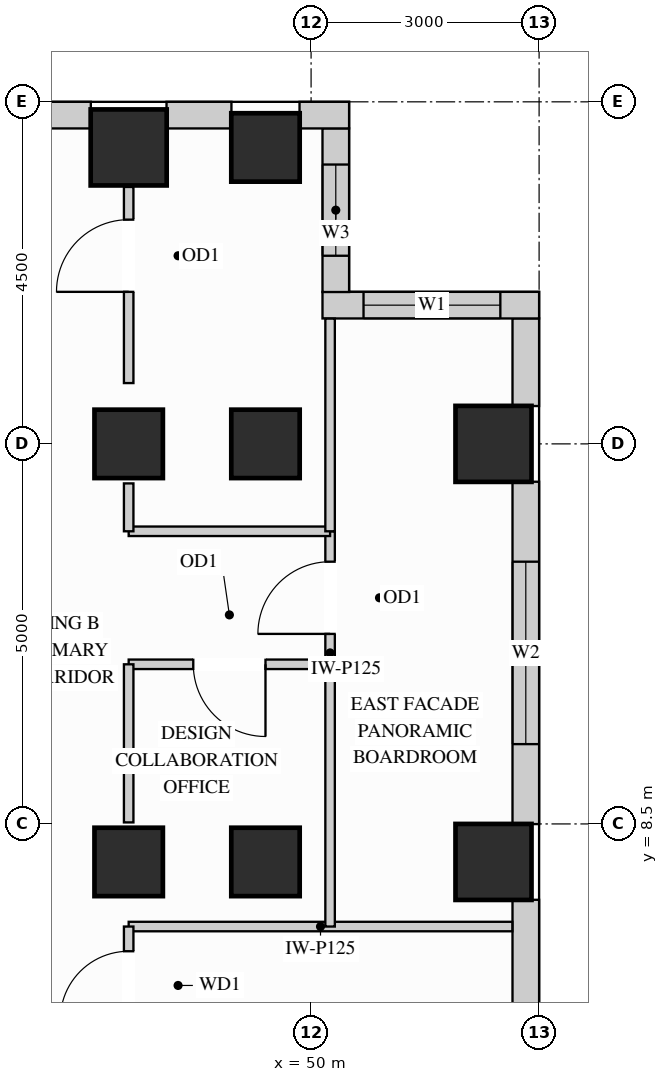
"""IFC4 building model, lengths in metres.
Left out: names, types, materials, properties, quantities, classifications, styles, units other than length and angle.
Written with IfcOpenShell. Run it as: python <this file> out.ifc"""

import sys

from ifc_helpers import new_model, si_unit, direction, frame, frame_2d, origin, origin_2d, place, context, subcontext, project, spatial, rectangle, extrude, source, transform, mapped, element, fill, save


model = new_model("IFC4")
c1 = context("Model", 3, precision=1e-05, world=origin(), true_north=direction((0.0, 1.0)))
c2 = subcontext(c1, "Body", "Model", "MODEL_VIEW")
j1 = project(units=[si_unit("LENGTHUNIT", "METRE"), si_unit("PLANEANGLEUNIT", "RADIAN")], contexts=[c1])
p1 = place(None, origin())
s1 = spatial("IfcSite", under=j1, at=p1, CompositionType="ELEMENT")
p2 = place(p1, origin())
s2 = spatial("IfcBuilding", under=s1, at=p2, CompositionType="ELEMENT")
p3 = place(p2, frame((0.0, 0.0, 197.1)))
s3 = spatial("IfcBuildingStorey", under=s2, at=p3, CompositionType="ELEMENT", Elevation=197.1)
m1 = source(origin(), c2, "Body", "SweptSolid", [
    extrude(rectangle(XDim=0.9, YDim=0.9, at=origin_2d()), origin(), (0.0, 0.0, 1.0), 3.4),
])
for number, where, z_axis, x_axis in (
    (1, (47.6, 13.5, 0.0), (0.0, 0.0, 1.0), (1.0, 0.0, 0.0)),
    (2, (47.6, 8.0, 0.0), (0.0, 0.0, 1.0), (1.0, 0.0, 0.0)),
    (3, (49.4, 13.5, 0.0), (0.0, 0.0, 1.0), (1.0, 0.0, 0.0)),
    (4, (49.4, 17.4, 0.0), (0.0, 0.0, 1.0), (1.0, 0.0, 0.0)),
    (5, (49.4, 8.0, 0.0), (0.0, 0.0, 1.0), (1.0, 0.0, 0.0)),
):
    element("IfcColumn", number, at=place(p3, frame(where, z_axis=z_axis, x_axis=x_axis)), inside=s3, PredefinedType="COLUMN", context=c2, shape_type="MappedRepresentation", body=[
        mapped(m1, transform((0.0, 0.0, 0.0), x_axis=(1.0, 0.0, 0.0), y_axis=(0.0, 1.0, 0.0), z_axis=(0.0, 0.0, 1.0))),
    ])
m2 = source(origin(), c2, "Body", "SweptSolid", [
    extrude(rectangle(XDim=1.0, YDim=1.0, at=origin_2d()), origin(), (0.0, 0.0, 1.0), 3.4),
])
for number, where, z_axis, x_axis in (
    (6, (47.6, 17.4, 0.0), (0.0, 0.0, 1.0), (1.0, 0.0, 0.0)),
    (7, (52.4, 13.5, 0.0), (0.0, 0.0, 1.0), (1.0, 0.0, 0.0)),
    (8, (52.4, 8.0, 0.0), (0.0, 0.0, 1.0), (1.0, 0.0, 0.0)),
):
    element("IfcColumn", number, at=place(p3, frame(where, z_axis=z_axis, x_axis=x_axis)), inside=s3, PredefinedType="COLUMN", context=c2, shape_type="MappedRepresentation", body=[
        mapped(m2, transform((0.0, 0.0, 0.0), x_axis=(1.0, 0.0, 0.0), y_axis=(0.0, 1.0, 0.0), z_axis=(0.0, 0.0, 1.0))),
    ])
m3 = source(origin(), c2, "Body", "SweptSolid", [
    extrude(rectangle(XDim=3.504, YDim=0.35, at=frame_2d((1.752, 0.0))), origin(), (0.0, 0.0, 1.0), 2.612),
])
p4 = place(p3, frame((52.825, 3.998, 0.0), z_axis=(0.0, 0.0, 1.0), x_axis=(0.0, 1.0, 0.0)))
e9 = element("IfcWall", 9, at=p4, inside=s3, PredefinedType="SOLIDWALL", context=c2, shape_type="MappedRepresentation", body=[
    mapped(m3, transform((0.0, 0.0, 0.0), x_axis=(1.0, 0.0, 0.0), y_axis=(0.0, 1.0, 0.0), z_axis=(0.0, 0.0, 1.0))),
])
p5 = place(p3, frame((52.825, 8.498, 0.0), z_axis=(0.0, 0.0, 1.0), x_axis=(0.0, 1.0, 0.0)))
e10 = element("IfcWall", 10, at=p5, inside=s3, PredefinedType="SOLIDWALL", context=c2, shape_type="SweptSolid", body=[
    extrude(rectangle(XDim=4.504, YDim=0.35, at=frame_2d((2.252, 0.0))), origin(), (0.0, 0.0, 1.0), 2.612),
])
p6 = place(p5, frame((1.052, 0.0, 0.78)))
e11 = element("IfcOpeningElement", 11, at=p6, cuts=e10, PredefinedType="OPENING", context=c2, shape_type="SweptSolid", body=[
    extrude(rectangle(XDim=2.4, YDim=1.652, at=frame_2d((1.2, 0.826))), frame((0.0, 0.185, 0.0), z_axis=(0.0, -1.0, 0.0), x_axis=(1.0, 0.0, 0.0)), (0.0, 0.0, 1.0), 0.37),
])
m4 = source(origin(), c2, "Body", "SweptSolid", [
    extrude(rectangle(XDim=1.154, YDim=0.35, at=frame_2d((0.577, 0.0))), origin(), (0.0, 0.0, 1.0), 3.385),
])
p7 = place(p3, frame((52.825, 13.998, 0.0), z_axis=(0.0, 0.0, 1.0), x_axis=(0.0, 1.0, 0.0)))
e12 = element("IfcWall", 12, at=p7, inside=s3, PredefinedType="SOLIDWALL", context=c2, shape_type="MappedRepresentation", body=[
    mapped(m4, transform((0.0, 0.0, 0.0), x_axis=(1.0, 0.0, 0.0), y_axis=(0.0, 1.0, 0.0), z_axis=(0.0, 0.0, 1.0))),
])
p8 = place(p3, frame((53.0, 15.325, 0.0), z_axis=(0.0, 0.0, 1.0), x_axis=(-1.0, 0.0, 0.0)))
e13 = element("IfcWall", 13, at=p8, inside=s3, PredefinedType="SOLIDWALL", context=c2, shape_type="SweptSolid", body=[
    extrude(rectangle(XDim=2.85, YDim=0.35, at=frame_2d((1.425, 0.0))), origin(), (0.0, 0.0, 1.0), 3.385),
])
p9 = place(p8, frame((0.51, 0.0, 0.78)))
e14 = element("IfcOpeningElement", 14, at=p9, cuts=e13, PredefinedType="OPENING", context=c2, shape_type="SweptSolid", body=[
    extrude(rectangle(XDim=1.8, YDim=2.1, at=frame_2d((0.9, 1.05))), frame((0.0, 0.185, 0.0), z_axis=(0.0, -1.0, 0.0), x_axis=(1.0, 0.0, 0.0)), (0.0, 0.0, 1.0), 0.37),
])
p10 = place(p3, frame((50.325, 15.498, 0.0), z_axis=(0.0, 0.0, 1.0), x_axis=(0.0, 1.0, 0.0)))
e15 = element("IfcWall", 15, at=p10, inside=s3, PredefinedType="SOLIDWALL", context=c2, shape_type="SweptSolid", body=[
    extrude(rectangle(XDim=2.154, YDim=0.35, at=frame_2d((1.077, 0.0))), origin(), (0.0, 0.0, 1.0), 3.385),
])
p11 = place(p10, frame((0.477, 0.0, 0.78)))
e16 = element("IfcOpeningElement", 16, at=p11, cuts=e15, PredefinedType="OPENING", context=c2, shape_type="SweptSolid", body=[
    extrude(rectangle(XDim=1.2, YDim=2.1, at=frame_2d((0.6, 1.05))), frame((0.0, 0.185, 0.0), z_axis=(0.0, -1.0, 0.0), x_axis=(1.0, 0.0, 0.0)), (0.0, 0.0, 1.0), 0.37),
])
m5 = source(origin(), c2, "Body", "SweptSolid", [
    extrude(rectangle(XDim=0.652, YDim=0.35, at=frame_2d((0.326, 0.0))), origin(), (0.0, 0.0, 1.0), 3.385),
])
p12 = place(p3, frame((50.5, 17.825, 0.0), z_axis=(0.0, 0.0, 1.0), x_axis=(-1.0, 0.0, 0.0)))
e17 = element("IfcWall", 17, at=p12, inside=s3, PredefinedType="SOLIDWALL", context=c2, shape_type="MappedRepresentation", body=[
    mapped(m5, transform((0.0, 0.0, 0.0), x_axis=(1.0, 0.0, 0.0), y_axis=(0.0, 1.0, 0.0), z_axis=(0.0, 0.0, 1.0))),
])
m6 = source(origin(), c2, "Body", "SweptSolid", [
    extrude(rectangle(XDim=0.854, YDim=0.35, at=frame_2d((0.427, 0.0))), origin(), (0.0, 0.0, 1.0), 3.385),
])
p13 = place(p3, frame((48.952, 17.825, 0.0), z_axis=(0.0, 0.0, 1.0), x_axis=(-1.0, 0.0, 0.0)))
e18 = element("IfcWall", 18, at=p13, inside=s3, PredefinedType="SOLIDWALL", context=c2, shape_type="MappedRepresentation", body=[
    mapped(m6, transform((0.0, 0.0, 0.0), x_axis=(1.0, 0.0, 0.0), y_axis=(0.0, 1.0, 0.0), z_axis=(0.0, 0.0, 1.0))),
])
p14 = place(p3, frame((47.102, 17.825, 0.0), z_axis=(0.0, 0.0, 1.0), x_axis=(-1.0, 0.0, 0.0)))
e19 = element("IfcWall", 19, at=p14, inside=s3, PredefinedType="SOLIDWALL", context=c2, shape_type="SweptSolid", body=[
    extrude(rectangle(XDim=6.604, YDim=0.35, at=frame_2d((3.302, 0.0))), origin(), (0.0, 0.0, 1.0), 2.612),
])
p15 = place(p14, frame((1.849, 0.0, 0.78)))
e20 = element("IfcOpeningElement", 20, at=p15, cuts=e19, PredefinedType="OPENING", context=c2, shape_type="SweptSolid", body=[
    extrude(rectangle(XDim=1.8, YDim=1.652, at=frame_2d((0.9, 0.826))), frame((0.0, 0.185, 0.0), z_axis=(0.0, -1.0, 0.0), x_axis=(1.0, 0.0, 0.0)), (0.0, 0.0, 1.0), 0.37),
])
p16 = place(p14, frame((4.067, 0.0, 0.78)))
e21 = element("IfcOpeningElement", 21, at=p16, cuts=e19, PredefinedType="OPENING", context=c2, shape_type="SweptSolid", body=[
    extrude(rectangle(XDim=1.8, YDim=1.652, at=frame_2d((0.9, 0.826))), frame((0.0, 0.185, 0.0), z_axis=(0.0, -1.0, 0.0), x_axis=(1.0, 0.0, 0.0)), (0.0, 0.0, 1.0), 0.37),
])
p17 = place(p3, frame((50.25, 10.6, 0.0), z_axis=(0.0, 0.0, 1.0), x_axis=(0.0, 1.0, 0.0)))
e22 = element("IfcWall", 22, at=p17, inside=s3, PredefinedType="PARTITIONING", context=c2, shape_type="SweptSolid", body=[
    extrude(rectangle(XDim=1.75, YDim=0.125, at=frame_2d((0.875, 0.0))), origin(), (0.0, 0.0, 1.0), 3.385),
])
p18 = place(p17, frame((0.4, 0.0, 0.0)))
e23 = element("IfcOpeningElement", 23, at=p18, cuts=e22, PredefinedType="OPENING", context=c2, shape_type="SweptSolid", body=[
    extrude(rectangle(XDim=0.95, YDim=2.15, at=frame_2d((0.475, 1.075))), frame((0.0, 0.073, 0.0), z_axis=(0.0, -1.0, 0.0), x_axis=(1.0, 0.0, 0.0)), (0.0, 0.0, 1.0), 0.145),
])
m7 = source(origin(), c2, "Body", "SweptSolid", [
    extrude(rectangle(XDim=5.048, YDim=0.125, at=frame_2d((2.524, 0.0))), origin(), (0.0, 0.0, 1.0), 3.385),
])
p19 = place(p3, frame((47.6, 7.15, 0.0), z_axis=(0.0, 0.0, 1.0), x_axis=(1.0, 0.0, 0.0)))
e24 = element("IfcWall", 24, at=p19, inside=s3, PredefinedType="PARTITIONING", context=c2, shape_type="MappedRepresentation", body=[
    mapped(m7, transform((0.0, 0.0, 0.0), x_axis=(1.0, 0.0, 0.0), y_axis=(0.0, 1.0, 0.0), z_axis=(0.0, 0.0, 1.0))),
])
m8 = source(origin(), c2, "Body", "SweptSolid", [
    extrude(rectangle(XDim=2.65, YDim=0.125, at=frame_2d((1.325, 0.0))), origin(), (0.0, 0.0, 1.0), 3.385),
])
p20 = place(p3, frame((47.6, 12.35, 0.0), z_axis=(0.0, 0.0, 1.0), x_axis=(1.0, 0.0, 0.0)))
e25 = element("IfcWall", 25, at=p20, inside=s3, PredefinedType="PARTITIONING", context=c2, shape_type="MappedRepresentation", body=[
    mapped(m8, transform((0.0, 0.0, 0.0), x_axis=(1.0, 0.0, 0.0), y_axis=(0.0, 1.0, 0.0), z_axis=(0.0, 0.0, 1.0))),
])
p21 = place(p3, frame((47.6, 10.6, 0.0), z_axis=(0.0, 0.0, 1.0), x_axis=(1.0, 0.0, 0.0)))
e26 = element("IfcWall", 26, at=p21, inside=s3, PredefinedType="PARTITIONING", context=c2, shape_type="SweptSolid", body=[
    extrude(rectangle(XDim=2.65, YDim=0.125, at=frame_2d((1.325, 0.0))), origin(), (0.0, 0.0, 1.0), 2.773),
])
p22 = place(p21, frame((0.85, 0.0, 0.0)))
e27 = element("IfcOpeningElement", 27, at=p22, cuts=e26, PredefinedType="OPENING", context=c2, shape_type="SweptSolid", body=[
    extrude(rectangle(XDim=0.95, YDim=2.15, at=frame_2d((0.475, 1.075))), frame((0.0, 0.073, 0.0), z_axis=(0.0, -1.0, 0.0), x_axis=(1.0, 0.0, 0.0)), (0.0, 0.0, 1.0), 0.145),
])
m9 = source(origin(), c2, "Body", "SweptSolid", [
    extrude(rectangle(XDim=3.45, YDim=0.125, at=frame_2d((1.725, 0.0))), origin(), (0.0, 0.0, 1.0), 3.385),
])
p23 = place(p3, frame((50.25, 7.15, 0.0), z_axis=(0.0, 0.0, 1.0), x_axis=(0.0, 1.0, 0.0)))
e28 = element("IfcWall", 28, at=p23, inside=s3, PredefinedType="PARTITIONING", context=c2, shape_type="MappedRepresentation", body=[
    mapped(m9, transform((0.0, 0.0, 0.0), x_axis=(1.0, 0.0, 0.0), y_axis=(0.0, 1.0, 0.0), z_axis=(0.0, 0.0, 1.0))),
])
m10 = source(origin(), c2, "Body", "SweptSolid", [
    extrude(rectangle(XDim=2.798, YDim=0.125, at=frame_2d((1.399, 0.0))), origin(), (0.0, 0.0, 1.0), 3.385),
])
p24 = place(p3, frame((50.25, 12.35, 0.0), z_axis=(0.0, 0.0, 1.0), x_axis=(0.0, 1.0, 0.0)))
e29 = element("IfcWall", 29, at=p24, inside=s3, PredefinedType="PARTITIONING", context=c2, shape_type="MappedRepresentation", body=[
    mapped(m10, transform((0.0, 0.0, 0.0), x_axis=(1.0, 0.0, 0.0), y_axis=(0.0, 1.0, 0.0), z_axis=(0.0, 0.0, 1.0))),
])
m11 = source(origin(), c2, "Body", "SweptSolid", [
    extrude(rectangle(XDim=2.08, YDim=0.125, at=frame_2d((1.04, 0.0))), origin(), (0.0, 0.0, 1.0), 2.773),
])
p25 = place(p3, frame((47.6, 8.52, 0.0), z_axis=(0.0, 0.0, 1.0), x_axis=(0.0, 1.0, 0.0)))
e30 = element("IfcWall", 30, at=p25, inside=s3, PredefinedType="PARTITIONING", context=c2, shape_type="MappedRepresentation", body=[
    mapped(m11, transform((0.0, 0.0, 0.0), x_axis=(1.0, 0.0, 0.0), y_axis=(0.0, 1.0, 0.0), z_axis=(0.0, 0.0, 1.0))),
])
p26 = place(p3, frame((47.6, 14.3, 0.0), z_axis=(0.0, 0.0, 1.0), x_axis=(0.0, 1.0, 0.0)))
e31 = element("IfcWall", 31, at=p26, inside=s3, PredefinedType="PARTITIONING", context=c2, shape_type="SweptSolid", body=[
    extrude(rectangle(XDim=2.58, YDim=0.125, at=frame_2d((1.29, 0.0))), origin(), (0.0, 0.0, 1.0), 2.773),
])
p27 = place(p26, frame((1.2, 0.0, 0.0)))
e32 = element("IfcOpeningElement", 32, at=p27, cuts=e31, PredefinedType="OPENING", context=c2, shape_type="SweptSolid", body=[
    extrude(rectangle(XDim=0.95, YDim=2.15, at=frame_2d((0.475, 1.075))), frame((0.0, 0.073, 0.0), z_axis=(0.0, -1.0, 0.0), x_axis=(1.0, 0.0, 0.0)), (0.0, 0.0, 1.0), 0.145),
])
m12 = source(origin(), c2, "Body", "SweptSolid", [
    extrude(rectangle(XDim=0.63, YDim=0.125, at=frame_2d((0.315, 0.0))), origin(), (0.0, 0.0, 1.0), 2.773),
])
p28 = place(p3, frame((47.6, 12.35, 0.0), z_axis=(0.0, 0.0, 1.0), x_axis=(0.0, 1.0, 0.0)))
e33 = element("IfcWall", 33, at=p28, inside=s3, PredefinedType="PARTITIONING", context=c2, shape_type="MappedRepresentation", body=[
    mapped(m12, transform((0.0, 0.0, 0.0), x_axis=(1.0, 0.0, 0.0), y_axis=(0.0, 1.0, 0.0), z_axis=(0.0, 0.0, 1.0))),
])
p29 = place(p3, frame((47.6, 5.65, 0.0), z_axis=(0.0, 0.0, 1.0), x_axis=(0.0, 1.0, 0.0)))
e34 = element("IfcWall", 34, at=p29, inside=s3, PredefinedType="PARTITIONING", context=c2, shape_type="SweptSolid", body=[
    extrude(rectangle(XDim=1.5, YDim=0.125, at=frame_2d((0.75, 0.0))), origin(), (0.0, 0.0, 1.0), 2.773),
])
p30 = place(p29, frame((0.275, 0.0, 0.0)))
e35 = element("IfcOpeningElement", 35, at=p30, cuts=e34, PredefinedType="OPENING", context=c2, shape_type="SweptSolid", body=[
    extrude(rectangle(XDim=0.9, YDim=2.15, at=frame_2d((0.45, 1.075))), frame((0.0, 0.073, 0.0), z_axis=(0.0, -1.0, 0.0), x_axis=(1.0, 0.0, 0.0)), (0.0, 0.0, 1.0), 0.145),
])
m13 = source(origin(), c2, "Body", "SweptSolid", [
    extrude(rectangle(XDim=0.95, YDim=2.15, at=frame_2d((0.475, 1.075))), frame((0.0, 0.025, 0.0), z_axis=(0.0, -1.0, 0.0), x_axis=(1.0, 0.0, 0.0)), (0.0, 0.0, 1.0), 0.05),
])
p31 = place(p22, origin())
e36 = element("IfcDoor", 36, at=p31, inside=s3, OperationType="SINGLE_SWING_RIGHT", PredefinedType="DOOR", context=c2, shape_type="MappedRepresentation", body=[
    mapped(m13, transform((0.0, 0.0, 0.0), x_axis=(1.0, 0.0, 0.0), y_axis=(0.0, 1.0, 0.0), z_axis=(0.0, 0.0, 1.0))),
])
fill(e27, e36)
p32 = place(p18, origin())
e37 = element("IfcDoor", 37, at=p32, inside=s3, OperationType="SINGLE_SWING_LEFT", PredefinedType="DOOR", context=c2, shape_type="MappedRepresentation", body=[
    mapped(m13, transform((0.0, 0.0, 0.0), x_axis=(1.0, 0.0, 0.0), y_axis=(0.0, 1.0, 0.0), z_axis=(0.0, 0.0, 1.0))),
])
fill(e23, e37)
p33 = place(p27, origin())
e38 = element("IfcDoor", 38, at=p33, inside=s3, OperationType="SINGLE_SWING_LEFT", PredefinedType="DOOR", context=c2, shape_type="MappedRepresentation", body=[
    mapped(m13, transform((0.0, 0.0, 0.0), x_axis=(1.0, 0.0, 0.0), y_axis=(0.0, 1.0, 0.0), z_axis=(0.0, 0.0, 1.0))),
])
fill(e32, e38)
m14 = source(origin(), c2, "Body", "SweptSolid", [
    extrude(rectangle(XDim=0.9, YDim=2.15, at=frame_2d((0.45, 1.075))), frame((0.0, 0.025, 0.0), z_axis=(0.0, -1.0, 0.0), x_axis=(1.0, 0.0, 0.0)), (0.0, 0.0, 1.0), 0.05),
])
p34 = place(p30, origin())
e39 = element("IfcDoor", 39, at=p34, inside=s3, OperationType="SINGLE_SWING_LEFT", PredefinedType="DOOR", context=c2, shape_type="MappedRepresentation", body=[
    mapped(m14, transform((0.0, 0.0, 0.0), x_axis=(1.0, 0.0, 0.0), y_axis=(0.0, 1.0, 0.0), z_axis=(0.0, 0.0, 1.0))),
])
fill(e35, e39)
m15 = source(origin(), c2, "Body", "SweptSolid", [
    extrude(rectangle(XDim=1.8, YDim=2.1, at=frame_2d((0.9, 1.05))), frame((0.0, 0.03, 0.0), z_axis=(0.0, -1.0, 0.0), x_axis=(1.0, 0.0, 0.0)), (0.0, 0.0, 1.0), 0.06),
])
p35 = place(p9, origin())
e40 = element("IfcWindow", 40, at=p35, inside=s3, PartitioningType="SINGLE_PANEL", PredefinedType="WINDOW", context=c2, shape_type="MappedRepresentation", body=[
    mapped(m15, transform((0.0, 0.0, 0.0), x_axis=(1.0, 0.0, 0.0), y_axis=(0.0, 1.0, 0.0), z_axis=(0.0, 0.0, 1.0))),
])
fill(e14, e40)
m16 = source(origin(), c2, "Body", "SweptSolid", [
    extrude(rectangle(XDim=2.4, YDim=1.652, at=frame_2d((1.2, 0.826))), frame((0.0, 0.03, 0.0), z_axis=(0.0, -1.0, 0.0), x_axis=(1.0, 0.0, 0.0)), (0.0, 0.0, 1.0), 0.06),
])
p36 = place(p6, origin())
e41 = element("IfcWindow", 41, at=p36, inside=s3, PartitioningType="SINGLE_PANEL", PredefinedType="WINDOW", context=c2, shape_type="MappedRepresentation", body=[
    mapped(m16, transform((0.0, 0.0, 0.0), x_axis=(1.0, 0.0, 0.0), y_axis=(0.0, 1.0, 0.0), z_axis=(0.0, 0.0, 1.0))),
])
fill(e11, e41)
m17 = source(origin(), c2, "Body", "SweptSolid", [
    extrude(rectangle(XDim=1.2, YDim=2.1, at=frame_2d((0.6, 1.05))), frame((0.0, 0.03, 0.0), z_axis=(0.0, -1.0, 0.0), x_axis=(1.0, 0.0, 0.0)), (0.0, 0.0, 1.0), 0.06),
])
p37 = place(p11, origin())
e42 = element("IfcWindow", 42, at=p37, inside=s3, PartitioningType="SINGLE_PANEL", PredefinedType="WINDOW", context=c2, shape_type="MappedRepresentation", body=[
    mapped(m17, transform((0.0, 0.0, 0.0), x_axis=(1.0, 0.0, 0.0), y_axis=(0.0, 1.0, 0.0), z_axis=(0.0, 0.0, 1.0))),
])
fill(e16, e42)
save(model, sys.argv[1])
